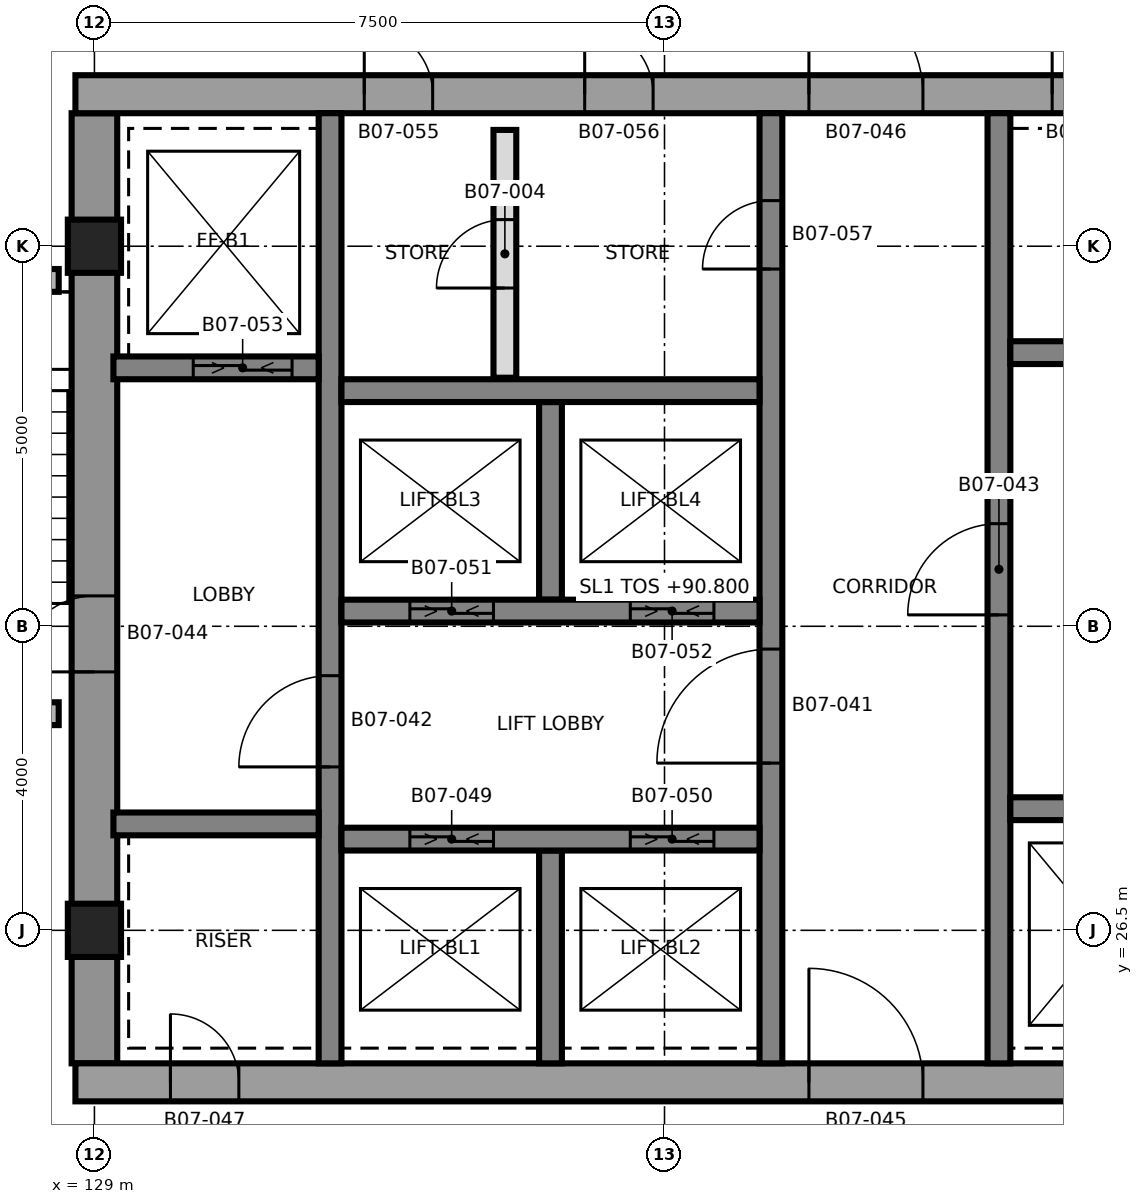
"""IFC4 building model, lengths in metres.
Left out: names, types, materials, properties, quantities, classifications, styles, units other than length and angle.
Written with IfcOpenShell. Run it as: python <this file> out.ifc"""

import sys

from ifc_helpers import new_model, si_unit, direction, frame, frame_2d, origin, origin_2d, place, context, subcontext, project, spatial, rectangle, extrude, element, fill, save


model = new_model("IFC4")
c1 = context("Model", 3, precision=1e-05, world=origin(), true_north=direction((0.0, 1.0)))
c2 = subcontext(c1, "Body", "Model", "MODEL_VIEW")
j1 = project(units=[si_unit("LENGTHUNIT", "METRE"), si_unit("PLANEANGLEUNIT", "RADIAN")], contexts=[c1])
p1 = place(None, origin())
s1 = spatial("IfcSite", under=j1, at=p1, CompositionType="ELEMENT")
p2 = place(p1, origin())
s2 = spatial("IfcBuilding", under=s1, at=p2, CompositionType="ELEMENT")
p3 = place(p2, frame((0.0, 0.0, 90.8)))
s3 = spatial("IfcBuildingStorey", under=s2, at=p3, CompositionType="ELEMENT", Elevation=90.8)
p4 = place(p3, frame((129.0, 24.75, 0.0), z_axis=(0.0, 0.0, 1.0), x_axis=(0.0, 1.0, 0.0)))
e1 = element("IfcWall", 1, at=p4, inside=s3, PredefinedType="SHEAR", context=c2, shape_type="SweptSolid", body=[
    extrude(rectangle(XDim=12.5, YDim=0.6, at=frame_2d((6.25, 0.0))), origin(), (0.0, 0.0, 1.0), 3.7),
])
p5 = place(p4, frame((5.15, 0.0, 0.0)))
e2 = element("IfcOpeningElement", 2, at=p5, cuts=e1, PredefinedType="OPENING", context=c2, shape_type="SweptSolid", body=[
    extrude(rectangle(XDim=1.0, YDim=2.1, at=frame_2d((0.5, 1.05))), frame((0.0, 0.31, 0.0), z_axis=(0.0, -1.0, 0.0), x_axis=(1.0, 0.0, 0.0)), (0.0, 0.0, 1.0), 0.62),
])
p6 = place(p3, frame((128.75, 24.5, 0.0), z_axis=(0.0, 0.0, 1.0), x_axis=(1.0, 0.0, 0.0)))
e3 = element("IfcWall", 3, at=p6, inside=s3, PredefinedType="SHEAR", context=c2, shape_type="SweptSolid", body=[
    extrude(rectangle(XDim=15.0, YDim=0.5, at=frame_2d((7.5, 0.0))), origin(), (0.0, 0.0, 1.0), 3.7),
])
p7 = place(p6, frame((9.65, 0.0, 0.0)))
e4 = element("IfcOpeningElement", 4, at=p7, cuts=e3, PredefinedType="OPENING", context=c2, shape_type="SweptSolid", body=[
    extrude(rectangle(XDim=1.5, YDim=2.1, at=frame_2d((0.75, 1.05))), frame((0.0, 0.26, 0.0), z_axis=(0.0, -1.0, 0.0), x_axis=(1.0, 0.0, 0.0)), (0.0, 0.0, 1.0), 0.52),
])
p8 = place(p6, frame((1.25, 0.0, 0.0)))
e5 = element("IfcOpeningElement", 5, at=p8, cuts=e3, PredefinedType="OPENING", context=c2, shape_type="SweptSolid", body=[
    extrude(rectangle(XDim=0.9, YDim=2.1, at=frame_2d((0.45, 1.05))), frame((0.0, 0.26, 0.0), z_axis=(0.0, -1.0, 0.0), x_axis=(1.0, 0.0, 0.0)), (0.0, 0.0, 1.0), 0.52),
])
p9 = place(p3, frame((128.75, 37.5, 0.0), z_axis=(0.0, 0.0, 1.0), x_axis=(1.0, 0.0, 0.0)))
e6 = element("IfcWall", 6, at=p9, inside=s3, PredefinedType="SHEAR", context=c2, shape_type="SweptSolid", body=[
    extrude(rectangle(XDim=15.0, YDim=0.5, at=frame_2d((7.5, 0.0))), origin(), (0.0, 0.0, 1.0), 3.7),
])
p10 = place(p9, frame((9.65, 0.0, 0.0)))
e7 = element("IfcOpeningElement", 7, at=p10, cuts=e6, PredefinedType="OPENING", context=c2, shape_type="SweptSolid", body=[
    extrude(rectangle(XDim=1.5, YDim=2.1, at=frame_2d((0.75, 1.05))), frame((0.0, 0.26, 0.0), z_axis=(0.0, -1.0, 0.0), x_axis=(1.0, 0.0, 0.0)), (0.0, 0.0, 1.0), 0.52),
])
p11 = place(p9, frame((12.85, 0.0, 0.0)))
e8 = element("IfcOpeningElement", 8, at=p11, cuts=e6, PredefinedType="OPENING", context=c2, shape_type="SweptSolid", body=[
    extrude(rectangle(XDim=0.9, YDim=2.1, at=frame_2d((0.45, 1.05))), frame((0.0, 0.26, 0.0), z_axis=(0.0, -1.0, 0.0), x_axis=(1.0, 0.0, 0.0)), (0.0, 0.0, 1.0), 0.52),
])
p12 = place(p9, frame((3.8, 0.0, 0.0)))
e9 = element("IfcOpeningElement", 9, at=p12, cuts=e6, PredefinedType="OPENING", context=c2, shape_type="SweptSolid", body=[
    extrude(rectangle(XDim=0.9, YDim=2.1, at=frame_2d((0.45, 1.05))), frame((0.0, 0.26, 0.0), z_axis=(0.0, -1.0, 0.0), x_axis=(1.0, 0.0, 0.0)), (0.0, 0.0, 1.0), 0.52),
])
p13 = place(p9, frame((6.7, 0.0, 0.0)))
e10 = element("IfcOpeningElement", 10, at=p13, cuts=e6, PredefinedType="OPENING", context=c2, shape_type="SweptSolid", body=[
    extrude(rectangle(XDim=0.9, YDim=2.1, at=frame_2d((0.45, 1.05))), frame((0.0, 0.26, 0.0), z_axis=(0.0, -1.0, 0.0), x_axis=(1.0, 0.0, 0.0)), (0.0, 0.0, 1.0), 0.52),
])
p14 = place(p3, frame((132.1, 24.75, 0.0), z_axis=(0.0, 0.0, 1.0), x_axis=(0.0, 1.0, 0.0)))
e11 = element("IfcWall", 11, at=p14, inside=s3, PredefinedType="SHEAR", context=c2, shape_type="SweptSolid", body=[
    extrude(rectangle(XDim=12.5, YDim=0.3, at=frame_2d((6.25, 0.0))), origin(), (0.0, 0.0, 1.0), 3.7),
])
p15 = place(p14, frame((3.9, 0.0, 0.0)))
e12 = element("IfcOpeningElement", 12, at=p15, cuts=e11, PredefinedType="OPENING", context=c2, shape_type="SweptSolid", body=[
    extrude(rectangle(XDim=1.2, YDim=2.1, at=frame_2d((0.6, 1.05))), frame((0.0, 0.16, 0.0), z_axis=(0.0, -1.0, 0.0), x_axis=(1.0, 0.0, 0.0)), (0.0, 0.0, 1.0), 0.32),
])
p16 = place(p3, frame((137.9, 24.75, 0.0), z_axis=(0.0, 0.0, 1.0), x_axis=(0.0, 1.0, 0.0)))
e13 = element("IfcWall", 13, at=p16, inside=s3, PredefinedType="SHEAR", context=c2, shape_type="SweptSolid", body=[
    extrude(rectangle(XDim=12.5, YDim=0.3, at=frame_2d((6.25, 0.0))), origin(), (0.0, 0.0, 1.0), 3.7),
])
p17 = place(p16, frame((3.95, 0.0, 0.0)))
e14 = element("IfcOpeningElement", 14, at=p17, cuts=e13, PredefinedType="OPENING", context=c2, shape_type="SweptSolid", body=[
    extrude(rectangle(XDim=1.5, YDim=2.1, at=frame_2d((0.75, 1.05))), frame((0.0, 0.16, 0.0), z_axis=(0.0, -1.0, 0.0), x_axis=(1.0, 0.0, 0.0)), (0.0, 0.0, 1.0), 0.32),
])
p18 = place(p16, frame((10.45, 0.0, 0.0)))
e15 = element("IfcOpeningElement", 15, at=p18, cuts=e13, PredefinedType="OPENING", context=c2, shape_type="SweptSolid", body=[
    extrude(rectangle(XDim=0.9, YDim=2.1, at=frame_2d((0.45, 1.05))), frame((0.0, 0.16, 0.0), z_axis=(0.0, -1.0, 0.0), x_axis=(1.0, 0.0, 0.0)), (0.0, 0.0, 1.0), 0.32),
])
p19 = place(p3, frame((140.9, 24.75, 0.0), z_axis=(0.0, 0.0, 1.0), x_axis=(0.0, 1.0, 0.0)))
e16 = element("IfcWall", 16, at=p19, inside=s3, PredefinedType="SHEAR", context=c2, shape_type="SweptSolid", body=[
    extrude(rectangle(XDim=12.5, YDim=0.3, at=frame_2d((6.25, 0.0))), origin(), (0.0, 0.0, 1.0), 3.7),
])
p20 = place(p19, frame((5.9, 0.0, 0.0)))
e17 = element("IfcOpeningElement", 17, at=p20, cuts=e16, PredefinedType="OPENING", context=c2, shape_type="SweptSolid", body=[
    extrude(rectangle(XDim=1.2, YDim=2.1, at=frame_2d((0.6, 1.05))), frame((0.0, 0.16, 0.0), z_axis=(0.0, -1.0, 0.0), x_axis=(1.0, 0.0, 0.0)), (0.0, 0.0, 1.0), 0.32),
])
p21 = place(p3, frame((135.0, 24.75, 0.0), z_axis=(0.0, 0.0, 1.0), x_axis=(0.0, 1.0, 0.0)))
e18 = element("IfcWall", 18, at=p21, inside=s3, PredefinedType="SHEAR", context=c2, shape_type="SweptSolid", body=[
    extrude(rectangle(XDim=2.8, YDim=0.3, at=frame_2d((1.4, 0.0))), origin(), (0.0, 0.0, 1.0), 3.7),
])
p22 = place(p3, frame((135.0, 30.85, 0.0), z_axis=(0.0, 0.0, 1.0), x_axis=(0.0, 1.0, 0.0)))
e19 = element("IfcWall", 19, at=p22, inside=s3, PredefinedType="SHEAR", context=c2, shape_type="SweptSolid", body=[
    extrude(rectangle(XDim=2.6, YDim=0.3, at=frame_2d((1.3, 0.0))), origin(), (0.0, 0.0, 1.0), 3.7),
])
p23 = place(p3, frame((132.25, 27.7, 0.0), z_axis=(0.0, 0.0, 1.0), x_axis=(1.0, 0.0, 0.0)))
e20 = element("IfcWall", 20, at=p23, inside=s3, PredefinedType="SHEAR", context=c2, shape_type="SweptSolid", body=[
    extrude(rectangle(XDim=5.5, YDim=0.3, at=frame_2d((2.75, 0.0))), origin(), (0.0, 0.0, 1.0), 3.7),
])
p24 = place(p23, frame((0.9, 0.0, 0.0)))
e21 = element("IfcOpeningElement", 21, at=p24, cuts=e20, PredefinedType="OPENING", context=c2, shape_type="SweptSolid", body=[
    extrude(rectangle(XDim=1.1, YDim=2.4, at=frame_2d((0.55, 1.2))), frame((0.0, 0.16, 0.0), z_axis=(0.0, -1.0, 0.0), x_axis=(1.0, 0.0, 0.0)), (0.0, 0.0, 1.0), 0.32),
])
p25 = place(p23, frame((3.8, 0.0, 0.0)))
e22 = element("IfcOpeningElement", 22, at=p25, cuts=e20, PredefinedType="OPENING", context=c2, shape_type="SweptSolid", body=[
    extrude(rectangle(XDim=1.1, YDim=2.4, at=frame_2d((0.55, 1.2))), frame((0.0, 0.16, 0.0), z_axis=(0.0, -1.0, 0.0), x_axis=(1.0, 0.0, 0.0)), (0.0, 0.0, 1.0), 0.32),
])
p26 = place(p3, frame((132.25, 30.7, 0.0), z_axis=(0.0, 0.0, 1.0), x_axis=(1.0, 0.0, 0.0)))
e23 = element("IfcWall", 23, at=p26, inside=s3, PredefinedType="SHEAR", context=c2, shape_type="SweptSolid", body=[
    extrude(rectangle(XDim=5.5, YDim=0.3, at=frame_2d((2.75, 0.0))), origin(), (0.0, 0.0, 1.0), 3.7),
])
p27 = place(p26, frame((0.9, 0.0, 0.0)))
e24 = element("IfcOpeningElement", 24, at=p27, cuts=e23, PredefinedType="OPENING", context=c2, shape_type="SweptSolid", body=[
    extrude(rectangle(XDim=1.1, YDim=2.4, at=frame_2d((0.55, 1.2))), frame((0.0, 0.16, 0.0), z_axis=(0.0, -1.0, 0.0), x_axis=(1.0, 0.0, 0.0)), (0.0, 0.0, 1.0), 0.32),
])
p28 = place(p26, frame((3.8, 0.0, 0.0)))
e25 = element("IfcOpeningElement", 25, at=p28, cuts=e23, PredefinedType="OPENING", context=c2, shape_type="SweptSolid", body=[
    extrude(rectangle(XDim=1.1, YDim=2.4, at=frame_2d((0.55, 1.2))), frame((0.0, 0.16, 0.0), z_axis=(0.0, -1.0, 0.0), x_axis=(1.0, 0.0, 0.0)), (0.0, 0.0, 1.0), 0.32),
])
p29 = place(p3, frame((132.25, 33.6, 0.0), z_axis=(0.0, 0.0, 1.0), x_axis=(1.0, 0.0, 0.0)))
e26 = element("IfcWall", 26, at=p29, inside=s3, PredefinedType="SHEAR", context=c2, shape_type="SweptSolid", body=[
    extrude(rectangle(XDim=5.5, YDim=0.3, at=frame_2d((2.75, 0.0))), origin(), (0.0, 0.0, 1.0), 3.7),
])
p30 = place(p3, frame((129.25, 27.9, 0.0), z_axis=(0.0, 0.0, 1.0), x_axis=(1.0, 0.0, 0.0)))
e27 = element("IfcWall", 27, at=p30, inside=s3, PredefinedType="SHEAR", context=c2, shape_type="SweptSolid", body=[
    extrude(rectangle(XDim=2.7, YDim=0.3, at=frame_2d((1.35, 0.0))), origin(), (0.0, 0.0, 1.0), 3.7),
])
p31 = place(p3, frame((129.25, 33.9, 0.0), z_axis=(0.0, 0.0, 1.0), x_axis=(1.0, 0.0, 0.0)))
e28 = element("IfcWall", 28, at=p31, inside=s3, PredefinedType="SHEAR", context=c2, shape_type="SweptSolid", body=[
    extrude(rectangle(XDim=2.7, YDim=0.3, at=frame_2d((1.35, 0.0))), origin(), (0.0, 0.0, 1.0), 3.7),
])
p32 = place(p31, frame((1.05, 0.0, 0.0)))
e29 = element("IfcOpeningElement", 29, at=p32, cuts=e28, PredefinedType="OPENING", context=c2, shape_type="SweptSolid", body=[
    extrude(rectangle(XDim=1.3, YDim=2.4, at=frame_2d((0.65, 1.2))), frame((0.0, 0.16, 0.0), z_axis=(0.0, -1.0, 0.0), x_axis=(1.0, 0.0, 0.0)), (0.0, 0.0, 1.0), 0.32),
])
p33 = place(p3, frame((141.05, 28.1, 0.0), z_axis=(0.0, 0.0, 1.0), x_axis=(1.0, 0.0, 0.0)))
e30 = element("IfcWall", 30, at=p33, inside=s3, PredefinedType="SHEAR", context=c2, shape_type="SweptSolid", body=[
    extrude(rectangle(XDim=2.7, YDim=0.3, at=frame_2d((1.35, 0.0))), origin(), (0.0, 0.0, 1.0), 3.7),
])
p34 = place(p33, frame((0.75, 0.0, 0.0)))
e31 = element("IfcOpeningElement", 31, at=p34, cuts=e30, PredefinedType="OPENING", context=c2, shape_type="SweptSolid", body=[
    extrude(rectangle(XDim=1.3, YDim=2.4, at=frame_2d((0.65, 1.2))), frame((0.0, 0.16, 0.0), z_axis=(0.0, -1.0, 0.0), x_axis=(1.0, 0.0, 0.0)), (0.0, 0.0, 1.0), 0.32),
])
p35 = place(p3, frame((141.05, 34.1, 0.0), z_axis=(0.0, 0.0, 1.0), x_axis=(1.0, 0.0, 0.0)))
e32 = element("IfcWall", 32, at=p35, inside=s3, PredefinedType="SHEAR", context=c2, shape_type="SweptSolid", body=[
    extrude(rectangle(XDim=2.7, YDim=0.3, at=frame_2d((1.35, 0.0))), origin(), (0.0, 0.0, 1.0), 3.7),
])
for number, where, z_axis, x_axis in (
    (33, (129.0, 26.5, 0.0), (0.0, 0.0, 1.0), (1.0, 0.0, 0.0)),
    (34, (129.0, 35.5, 0.0), (0.0, 0.0, 1.0), (1.0, 0.0, 0.0)),
):
    element("IfcColumn", number, at=place(p3, frame(where, z_axis=z_axis, x_axis=x_axis)), inside=s3, PredefinedType="COLUMN", context=c2, shape_type="SweptSolid", body=[
        extrude(rectangle(XDim=0.7, YDim=0.7, at=origin_2d()), origin(), (0.0, 0.0, 1.0), 3.7),
    ])
p36 = place(p3, frame((125.7, 29.35, 0.0), z_axis=(0.0, 0.0, 1.0), x_axis=(1.0, 0.0, 0.0)))
e35 = element("IfcWall", 35, at=p36, inside=s3, PredefinedType="SHEAR", context=c2, shape_type="SweptSolid", body=[
    extrude(rectangle(XDim=2.83, YDim=0.3, at=frame_2d((1.415, 0.0))), origin(), (0.0, 0.0, 1.0), 3.4),
])
p37 = place(p36, frame((0.975, 0.0, 0.0)))
e36 = element("IfcOpeningElement", 36, at=p37, cuts=e35, PredefinedType="OPENING", context=c2, shape_type="SweptSolid", body=[
    extrude(rectangle(XDim=1.2, YDim=2.1, at=frame_2d((0.6, 1.05))), frame((0.0, 0.16, 0.0), z_axis=(0.0, -1.0, 0.0), x_axis=(1.0, 0.0, 0.0)), (0.0, 0.0, 1.0), 0.32),
])
p38 = place(p3, frame((125.7, 35.05, 0.0), z_axis=(0.0, 0.0, 1.0), x_axis=(1.0, 0.0, 0.0)))
e37 = element("IfcWall", 37, at=p38, inside=s3, PredefinedType="SHEAR", context=c2, shape_type="SweptSolid", body=[
    extrude(rectangle(XDim=2.83, YDim=0.3, at=frame_2d((1.415, 0.0))), origin(), (0.0, 0.0, 1.0), 3.4),
])
p39 = place(p3, frame((134.4, 33.77, 0.0), z_axis=(0.0, 0.0, 1.0), x_axis=(0.0, 1.0, 0.0)))
e38 = element("IfcWall", 38, at=p39, inside=s3, PredefinedType="PARTITIONING", context=c2, shape_type="SweptSolid", body=[
    extrude(rectangle(XDim=3.26, YDim=0.3, at=frame_2d((1.63, 0.0))), origin(), (0.0, 0.0, 1.0), 3.4),
])
p40 = place(p39, frame((1.18, 0.0, 0.0)))
e39 = element("IfcOpeningElement", 39, at=p40, cuts=e38, PredefinedType="OPENING", context=c2, shape_type="SweptSolid", body=[
    extrude(rectangle(XDim=0.9, YDim=2.1, at=frame_2d((0.45, 1.05))), frame((0.0, 0.16, 0.0), z_axis=(0.0, -1.0, 0.0), x_axis=(1.0, 0.0, 0.0)), (0.0, 0.0, 1.0), 0.32),
])
p41 = place(p40, origin())
e40 = element("IfcDoor", 40, at=p41, inside=s3, OperationType="SINGLE_SWING_RIGHT", PredefinedType="DOOR", context=c2, shape_type="SweptSolid", body=[
    extrude(rectangle(XDim=0.9, YDim=2.1, at=frame_2d((0.45, 1.05))), frame((0.0, 0.025, 0.0), z_axis=(0.0, -1.0, 0.0), x_axis=(1.0, 0.0, 0.0)), (0.0, 0.0, 1.0), 0.05),
])
fill(e39, e40)
p42 = place(p17, origin())
e41 = element("IfcDoor", 41, at=p42, inside=s3, OperationType="SINGLE_SWING_RIGHT", PredefinedType="DOOR", context=c2, shape_type="SweptSolid", body=[
    extrude(rectangle(XDim=1.5, YDim=2.1, at=frame_2d((0.75, 1.05))), frame((0.0, 0.025, 0.0), z_axis=(0.0, -1.0, 0.0), x_axis=(1.0, 0.0, 0.0)), (0.0, 0.0, 1.0), 0.05),
])
fill(e14, e41)
p43 = place(p15, origin())
e42 = element("IfcDoor", 42, at=p43, inside=s3, OperationType="SINGLE_SWING_LEFT", PredefinedType="DOOR", context=c2, shape_type="SweptSolid", body=[
    extrude(rectangle(XDim=1.2, YDim=2.1, at=frame_2d((0.6, 1.05))), frame((0.0, 0.025, 0.0), z_axis=(0.0, -1.0, 0.0), x_axis=(1.0, 0.0, 0.0)), (0.0, 0.0, 1.0), 0.05),
])
fill(e12, e42)
p44 = place(p20, origin())
e43 = element("IfcDoor", 43, at=p44, inside=s3, OperationType="SINGLE_SWING_RIGHT", PredefinedType="DOOR", context=c2, shape_type="SweptSolid", body=[
    extrude(rectangle(XDim=1.2, YDim=2.1, at=frame_2d((0.6, 1.05))), frame((0.0, 0.025, 0.0), z_axis=(0.0, -1.0, 0.0), x_axis=(1.0, 0.0, 0.0)), (0.0, 0.0, 1.0), 0.05),
])
fill(e17, e43)
p45 = place(p5, origin())
e44 = element("IfcDoor", 44, at=p45, inside=s3, OperationType="SINGLE_SWING_RIGHT", PredefinedType="DOOR", context=c2, shape_type="SweptSolid", body=[
    extrude(rectangle(XDim=1.0, YDim=2.1, at=frame_2d((0.5, 1.05))), frame((0.0, 0.025, 0.0), z_axis=(0.0, -1.0, 0.0), x_axis=(1.0, 0.0, 0.0)), (0.0, 0.0, 1.0), 0.05),
])
fill(e2, e44)
p46 = place(p7, origin())
e45 = element("IfcDoor", 45, at=p46, inside=s3, OperationType="SINGLE_SWING_LEFT", PredefinedType="DOOR", context=c2, shape_type="SweptSolid", body=[
    extrude(rectangle(XDim=1.5, YDim=2.1, at=frame_2d((0.75, 1.05))), frame((0.0, 0.025, 0.0), z_axis=(0.0, -1.0, 0.0), x_axis=(1.0, 0.0, 0.0)), (0.0, 0.0, 1.0), 0.05),
])
fill(e4, e45)
p47 = place(p10, origin())
e46 = element("IfcDoor", 46, at=p47, inside=s3, OperationType="SINGLE_SWING_RIGHT", PredefinedType="DOOR", context=c2, shape_type="SweptSolid", body=[
    extrude(rectangle(XDim=1.5, YDim=2.1, at=frame_2d((0.75, 1.05))), frame((0.0, 0.025, 0.0), z_axis=(0.0, -1.0, 0.0), x_axis=(1.0, 0.0, 0.0)), (0.0, 0.0, 1.0), 0.05),
])
fill(e7, e46)
p48 = place(p8, origin())
e47 = element("IfcDoor", 47, at=p48, inside=s3, OperationType="SINGLE_SWING_LEFT", PredefinedType="DOOR", context=c2, shape_type="SweptSolid", body=[
    extrude(rectangle(XDim=0.9, YDim=2.1, at=frame_2d((0.45, 1.05))), frame((0.0, 0.025, 0.0), z_axis=(0.0, -1.0, 0.0), x_axis=(1.0, 0.0, 0.0)), (0.0, 0.0, 1.0), 0.05),
])
fill(e5, e47)
p49 = place(p11, origin())
e48 = element("IfcDoor", 48, at=p49, inside=s3, OperationType="SINGLE_SWING_RIGHT", PredefinedType="DOOR", context=c2, shape_type="SweptSolid", body=[
    extrude(rectangle(XDim=0.9, YDim=2.1, at=frame_2d((0.45, 1.05))), frame((0.0, 0.025, 0.0), z_axis=(0.0, -1.0, 0.0), x_axis=(1.0, 0.0, 0.0)), (0.0, 0.0, 1.0), 0.05),
])
fill(e8, e48)
p50 = place(p24, origin())
e49 = element("IfcDoor", 49, at=p50, inside=s3, OperationType="SLIDING_TO_LEFT", PredefinedType="DOOR", context=c2, shape_type="SweptSolid", body=[
    extrude(rectangle(XDim=1.1, YDim=2.4, at=frame_2d((0.55, 1.2))), frame((0.0, 0.025, 0.0), z_axis=(0.0, -1.0, 0.0), x_axis=(1.0, 0.0, 0.0)), (0.0, 0.0, 1.0), 0.05),
])
fill(e21, e49)
p51 = place(p25, origin())
e50 = element("IfcDoor", 50, at=p51, inside=s3, OperationType="SLIDING_TO_LEFT", PredefinedType="DOOR", context=c2, shape_type="SweptSolid", body=[
    extrude(rectangle(XDim=1.1, YDim=2.4, at=frame_2d((0.55, 1.2))), frame((0.0, 0.025, 0.0), z_axis=(0.0, -1.0, 0.0), x_axis=(1.0, 0.0, 0.0)), (0.0, 0.0, 1.0), 0.05),
])
fill(e22, e50)
p52 = place(p27, origin())
e51 = element("IfcDoor", 51, at=p52, inside=s3, OperationType="SLIDING_TO_LEFT", PredefinedType="DOOR", context=c2, shape_type="SweptSolid", body=[
    extrude(rectangle(XDim=1.1, YDim=2.4, at=frame_2d((0.55, 1.2))), frame((0.0, 0.025, 0.0), z_axis=(0.0, -1.0, 0.0), x_axis=(1.0, 0.0, 0.0)), (0.0, 0.0, 1.0), 0.05),
])
fill(e24, e51)
p53 = place(p28, origin())
e52 = element("IfcDoor", 52, at=p53, inside=s3, OperationType="SLIDING_TO_LEFT", PredefinedType="DOOR", context=c2, shape_type="SweptSolid", body=[
    extrude(rectangle(XDim=1.1, YDim=2.4, at=frame_2d((0.55, 1.2))), frame((0.0, 0.025, 0.0), z_axis=(0.0, -1.0, 0.0), x_axis=(1.0, 0.0, 0.0)), (0.0, 0.0, 1.0), 0.05),
])
fill(e25, e52)
p54 = place(p32, origin())
e53 = element("IfcDoor", 53, at=p54, inside=s3, OperationType="SLIDING_TO_LEFT", PredefinedType="DOOR", context=c2, shape_type="SweptSolid", body=[
    extrude(rectangle(XDim=1.3, YDim=2.4, at=frame_2d((0.65, 1.2))), frame((0.0, 0.025, 0.0), z_axis=(0.0, -1.0, 0.0), x_axis=(1.0, 0.0, 0.0)), (0.0, 0.0, 1.0), 0.05),
])
fill(e29, e53)
p55 = place(p12, origin())
e54 = element("IfcDoor", 54, at=p55, inside=s3, OperationType="SINGLE_SWING_LEFT", PredefinedType="DOOR", context=c2, shape_type="SweptSolid", body=[
    extrude(rectangle(XDim=0.9, YDim=2.1, at=frame_2d((0.45, 1.05))), frame((0.0, 0.025, 0.0), z_axis=(0.0, -1.0, 0.0), x_axis=(1.0, 0.0, 0.0)), (0.0, 0.0, 1.0), 0.05),
])
fill(e9, e54)
p56 = place(p13, origin())
e55 = element("IfcDoor", 55, at=p56, inside=s3, OperationType="SINGLE_SWING_RIGHT", PredefinedType="DOOR", context=c2, shape_type="SweptSolid", body=[
    extrude(rectangle(XDim=0.9, YDim=2.1, at=frame_2d((0.45, 1.05))), frame((0.0, 0.025, 0.0), z_axis=(0.0, -1.0, 0.0), x_axis=(1.0, 0.0, 0.0)), (0.0, 0.0, 1.0), 0.05),
])
fill(e10, e55)
p57 = place(p18, origin())
e56 = element("IfcDoor", 56, at=p57, inside=s3, OperationType="SINGLE_SWING_RIGHT", PredefinedType="DOOR", context=c2, shape_type="SweptSolid", body=[
    extrude(rectangle(XDim=0.9, YDim=2.1, at=frame_2d((0.45, 1.05))), frame((0.0, 0.025, 0.0), z_axis=(0.0, -1.0, 0.0), x_axis=(1.0, 0.0, 0.0)), (0.0, 0.0, 1.0), 0.05),
])
fill(e15, e56)
save(model, sys.argv[1])
